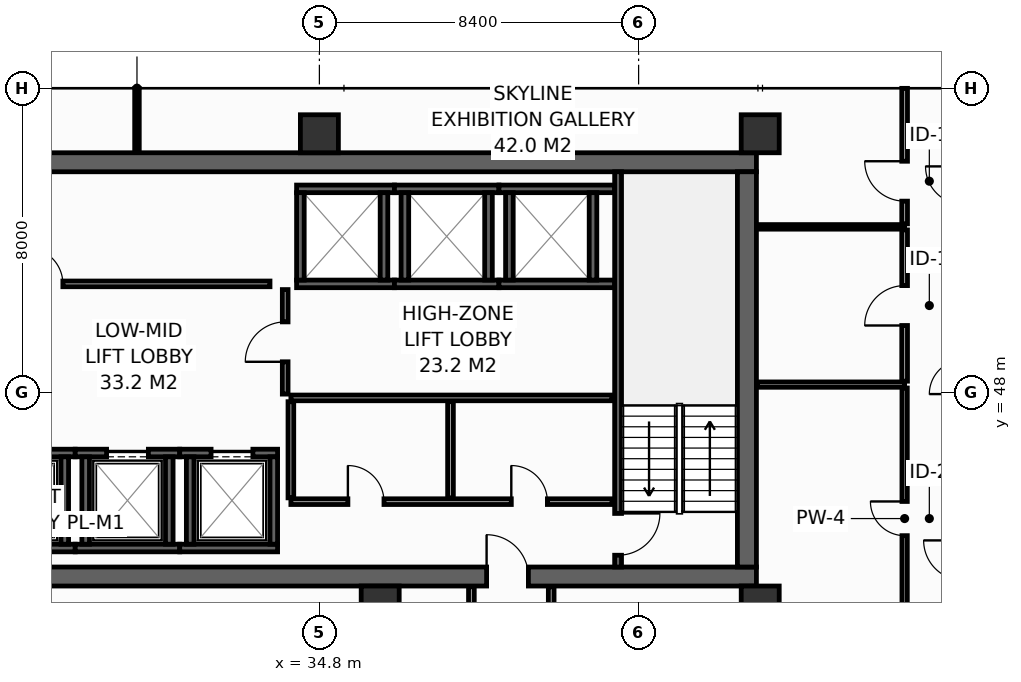
"""IFC4 building model, lengths in metres.
Left out: names, types, materials, properties, quantities, classifications, styles, units other than length and angle.
Written with IfcOpenShell. Run it as: python <this file> out.ifc"""

import sys

from ifc_helpers import new_model, si_unit, direction, frame, frame_2d, origin, origin_2d, place, context, subcontext, project, spatial, rectangle, hollow_rectangle, extrude, element, fill, save


model = new_model("IFC4")
c1 = context("Model", 3, precision=1e-05, world=origin(), true_north=direction((0.0, 1.0)))
c2 = subcontext(c1, "Body", "Model", "MODEL_VIEW")
j1 = project(units=[si_unit("LENGTHUNIT", "METRE"), si_unit("PLANEANGLEUNIT", "RADIAN")], contexts=[c1])
p1 = place(None, origin())
s1 = spatial("IfcSite", under=j1, at=p1, CompositionType="ELEMENT")
p2 = place(p1, origin())
s2 = spatial("IfcBuilding", under=s1, at=p2, CompositionType="ELEMENT")
p3 = place(p2, frame((0.0, 0.0, 156.2)))
s3 = spatial("IfcBuildingStorey", under=s2, at=p3, CompositionType="ELEMENT", Elevation=156.2)
p4 = place(p3, frame((13.6, 43.15, 0.0), z_axis=(0.0, 0.0, 1.0), x_axis=(1.0, 0.0, 0.0)))
e1 = element("IfcWall", 1, at=p4, inside=s3, PredefinedType="SHEAR", context=c2, shape_type="SweptSolid", body=[
    extrude(rectangle(XDim=32.7, YDim=0.5, at=frame_2d((16.35, 0.0))), origin(), (0.0, 0.0, 1.0), 3.55),
])
p5 = place(p4, frame((5.4, 0.0, 0.0)))
e2 = element("IfcOpeningElement", 2, at=p5, cuts=e1, PredefinedType="OPENING", context=c2, shape_type="SweptSolid", body=[
    extrude(rectangle(XDim=1.1, YDim=2.15, at=frame_2d((0.55, 1.075))), frame((0.0, 0.26, 0.0), z_axis=(0.0, -1.0, 0.0), x_axis=(1.0, 0.0, 0.0)), (0.0, 0.0, 1.0), 0.52),
])
p6 = place(p4, frame((25.6, 0.0, 0.0)))
e3 = element("IfcOpeningElement", 3, at=p6, cuts=e1, PredefinedType="OPENING", context=c2, shape_type="SweptSolid", body=[
    extrude(rectangle(XDim=1.1, YDim=2.15, at=frame_2d((0.55, 1.075))), frame((0.0, 0.26, 0.0), z_axis=(0.0, -1.0, 0.0), x_axis=(1.0, 0.0, 0.0)), (0.0, 0.0, 1.0), 0.52),
])
p7 = place(p3, frame((13.6, 54.05, 0.0), z_axis=(0.0, 0.0, 1.0), x_axis=(1.0, 0.0, 0.0)))
e4 = element("IfcWall", 4, at=p7, inside=s3, PredefinedType="SHEAR", context=c2, shape_type="SweptSolid", body=[
    extrude(rectangle(XDim=32.7, YDim=0.5, at=frame_2d((16.35, 0.0))), origin(), (0.0, 0.0, 1.0), 3.55),
])
p8 = place(p3, frame((46.05, 43.4, 0.0), z_axis=(0.0, 0.0, 1.0), x_axis=(0.0, 1.0, 0.0)))
e5 = element("IfcWall", 5, at=p8, inside=s3, PredefinedType="SHEAR", context=c2, shape_type="SweptSolid", body=[
    extrude(rectangle(XDim=10.4, YDim=0.5, at=frame_2d((5.2, 0.0))), origin(), (0.0, 0.0, 1.0), 3.55),
])
for number, where, z_axis, x_axis in (
    (6, (34.8, 54.8, 0.0), (0.0, 0.0, 1.0), (1.0, 0.0, 0.0)),
    (7, (46.4, 54.8, 0.0), (0.0, 0.0, 1.0), (1.0, 0.0, 0.0)),
    (8, (36.4, 42.4, 0.0), (0.0, 0.0, 1.0), (1.0, 0.0, 0.0)),
    (9, (46.4, 42.4, 0.0), (0.0, 0.0, 1.0), (1.0, 0.0, 0.0)),
):
    element("IfcColumn", number, at=place(p3, frame(where, z_axis=z_axis, x_axis=x_axis)), inside=s3, PredefinedType="COLUMN", context=c2, shape_type="SweptSolid", body=[
        extrude(hollow_rectangle(XDim=1.0, YDim=1.0, WallThickness=0.045, at=origin_2d()), origin(), (0.0, 0.0, 1.0), 3.8),
    ])
p9 = place(p3, frame((25.8, 43.9, 0.0), z_axis=(0.0, 0.0, 1.0), x_axis=(1.0, 0.0, 0.0)))
e10 = element("IfcWall", 10, at=p9, inside=s3, PredefinedType="SHEAR", context=c2, shape_type="SweptSolid", body=[
    extrude(rectangle(XDim=2.575, YDim=0.2, at=frame_2d((1.288, 0.0))), origin(), (0.0, 0.0, 1.0), 3.55),
])
p10 = place(p3, frame((25.8, 46.4, 0.0), z_axis=(0.0, 0.0, 1.0), x_axis=(1.0, 0.0, 0.0)))
e11 = element("IfcWall", 11, at=p10, inside=s3, PredefinedType="SHEAR", context=c2, shape_type="SweptSolid", body=[
    extrude(rectangle(XDim=2.575, YDim=0.2, at=frame_2d((1.288, 0.0))), origin(), (0.0, 0.0, 1.0), 3.55),
])
p11 = place(p10, frame((0.65, 0.0, 0.0)))
e12 = element("IfcOpeningElement", 12, at=p11, cuts=e11, PredefinedType="OPENING", context=c2, shape_type="SweptSolid", body=[
    extrude(rectangle(XDim=1.1, YDim=2.2, at=frame_2d((0.55, 1.1))), frame((0.0, 0.11, 0.0), z_axis=(0.0, -1.0, 0.0), x_axis=(1.0, 0.0, 0.0)), (0.0, 0.0, 1.0), 0.22),
])
p12 = place(p3, frame((28.1, 44.0, 0.0), z_axis=(0.0, 0.0, 1.0), x_axis=(0.0, 1.0, 0.0)))
e13 = element("IfcWall", 13, at=p12, inside=s3, PredefinedType="SHEAR", context=c2, shape_type="SweptSolid", body=[
    extrude(rectangle(XDim=2.3, YDim=0.2, at=frame_2d((1.15, 0.0))), origin(), (0.0, 0.0, 1.0), 3.55),
])
p13 = place(p3, frame((28.375, 43.9, 0.0), z_axis=(0.0, 0.0, 1.0), x_axis=(1.0, 0.0, 0.0)))
e14 = element("IfcWall", 14, at=p13, inside=s3, PredefinedType="SHEAR", context=c2, shape_type="SweptSolid", body=[
    extrude(rectangle(XDim=2.75, YDim=0.2, at=frame_2d((1.375, 0.0))), origin(), (0.0, 0.0, 1.0), 3.55),
])
p14 = place(p3, frame((28.375, 46.4, 0.0), z_axis=(0.0, 0.0, 1.0), x_axis=(1.0, 0.0, 0.0)))
e15 = element("IfcWall", 15, at=p14, inside=s3, PredefinedType="SHEAR", context=c2, shape_type="SweptSolid", body=[
    extrude(rectangle(XDim=2.75, YDim=0.2, at=frame_2d((1.375, 0.0))), origin(), (0.0, 0.0, 1.0), 3.55),
])
p15 = place(p14, frame((0.825, 0.0, 0.0)))
e16 = element("IfcOpeningElement", 16, at=p15, cuts=e15, PredefinedType="OPENING", context=c2, shape_type="SweptSolid", body=[
    extrude(rectangle(XDim=1.1, YDim=2.2, at=frame_2d((0.55, 1.1))), frame((0.0, 0.11, 0.0), z_axis=(0.0, -1.0, 0.0), x_axis=(1.0, 0.0, 0.0)), (0.0, 0.0, 1.0), 0.22),
])
for number, where, z_axis, x_axis in (
    (17, (28.65, 44.0, 0.0), (0.0, 0.0, 1.0), (0.0, 1.0, 0.0)),
    (18, (30.85, 44.0, 0.0), (0.0, 0.0, 1.0), (0.0, 1.0, 0.0)),
):
    element("IfcWall", number, at=place(p3, frame(where, z_axis=z_axis, x_axis=x_axis)), inside=s3, PredefinedType="SHEAR", context=c2, shape_type="SweptSolid", body=[
        extrude(rectangle(XDim=2.3, YDim=0.2, at=frame_2d((1.15, 0.0))), origin(), (0.0, 0.0, 1.0), 3.55),
    ])
p16 = place(p3, frame((31.125, 43.9, 0.0), z_axis=(0.0, 0.0, 1.0), x_axis=(1.0, 0.0, 0.0)))
e19 = element("IfcWall", 19, at=p16, inside=s3, PredefinedType="SHEAR", context=c2, shape_type="SweptSolid", body=[
    extrude(rectangle(XDim=2.575, YDim=0.2, at=frame_2d((1.288, 0.0))), origin(), (0.0, 0.0, 1.0), 3.55),
])
p17 = place(p3, frame((31.125, 46.4, 0.0), z_axis=(0.0, 0.0, 1.0), x_axis=(1.0, 0.0, 0.0)))
e20 = element("IfcWall", 20, at=p17, inside=s3, PredefinedType="SHEAR", context=c2, shape_type="SweptSolid", body=[
    extrude(rectangle(XDim=2.575, YDim=0.2, at=frame_2d((1.288, 0.0))), origin(), (0.0, 0.0, 1.0), 3.55),
])
p18 = place(p17, frame((0.825, 0.0, 0.0)))
e21 = element("IfcOpeningElement", 21, at=p18, cuts=e20, PredefinedType="OPENING", context=c2, shape_type="SweptSolid", body=[
    extrude(rectangle(XDim=1.1, YDim=2.2, at=frame_2d((0.55, 1.1))), frame((0.0, 0.11, 0.0), z_axis=(0.0, -1.0, 0.0), x_axis=(1.0, 0.0, 0.0)), (0.0, 0.0, 1.0), 0.22),
])
for number, where, z_axis, x_axis in (
    (22, (31.4, 44.0, 0.0), (0.0, 0.0, 1.0), (0.0, 1.0, 0.0)),
    (23, (33.6, 44.0, 0.0), (0.0, 0.0, 1.0), (0.0, 1.0, 0.0)),
):
    element("IfcWall", number, at=place(p3, frame(where, z_axis=z_axis, x_axis=x_axis)), inside=s3, PredefinedType="SHEAR", context=c2, shape_type="SweptSolid", body=[
        extrude(rectangle(XDim=2.3, YDim=0.2, at=frame_2d((1.15, 0.0))), origin(), (0.0, 0.0, 1.0), 3.55),
    ])
for number, where, z_axis, x_axis in (
    (24, (34.2, 50.85, 0.0), (0.0, 0.0, 1.0), (1.0, 0.0, 0.0)),
    (25, (34.2, 53.35, 0.0), (0.0, 0.0, 1.0), (1.0, 0.0, 0.0)),
):
    element("IfcWall", number, at=place(p3, frame(where, z_axis=z_axis, x_axis=x_axis)), inside=s3, PredefinedType="SHEAR", context=c2, shape_type="SweptSolid", body=[
        extrude(rectangle(XDim=2.575, YDim=0.2, at=frame_2d((1.288, 0.0))), origin(), (0.0, 0.0, 1.0), 3.55),
    ])
for number, where, z_axis, x_axis in (
    (26, (34.3, 50.95, 0.0), (0.0, 0.0, 1.0), (0.0, 1.0, 0.0)),
    (27, (36.5, 50.95, 0.0), (0.0, 0.0, 1.0), (0.0, 1.0, 0.0)),
):
    element("IfcWall", number, at=place(p3, frame(where, z_axis=z_axis, x_axis=x_axis)), inside=s3, PredefinedType="SHEAR", context=c2, shape_type="SweptSolid", body=[
        extrude(rectangle(XDim=2.3, YDim=0.2, at=frame_2d((1.15, 0.0))), origin(), (0.0, 0.0, 1.0), 3.55),
    ])
for number, where, z_axis, x_axis in (
    (28, (36.775, 50.85, 0.0), (0.0, 0.0, 1.0), (1.0, 0.0, 0.0)),
    (29, (36.775, 53.35, 0.0), (0.0, 0.0, 1.0), (1.0, 0.0, 0.0)),
):
    element("IfcWall", number, at=place(p3, frame(where, z_axis=z_axis, x_axis=x_axis)), inside=s3, PredefinedType="SHEAR", context=c2, shape_type="SweptSolid", body=[
        extrude(rectangle(XDim=2.75, YDim=0.2, at=frame_2d((1.375, 0.0))), origin(), (0.0, 0.0, 1.0), 3.55),
    ])
for number, where, z_axis, x_axis in (
    (30, (37.05, 50.95, 0.0), (0.0, 0.0, 1.0), (0.0, 1.0, 0.0)),
    (31, (39.25, 50.95, 0.0), (0.0, 0.0, 1.0), (0.0, 1.0, 0.0)),
):
    element("IfcWall", number, at=place(p3, frame(where, z_axis=z_axis, x_axis=x_axis)), inside=s3, PredefinedType="SHEAR", context=c2, shape_type="SweptSolid", body=[
        extrude(rectangle(XDim=2.3, YDim=0.2, at=frame_2d((1.15, 0.0))), origin(), (0.0, 0.0, 1.0), 3.55),
    ])
for number, where, z_axis, x_axis in (
    (32, (39.525, 50.85, 0.0), (0.0, 0.0, 1.0), (1.0, 0.0, 0.0)),
    (33, (39.525, 53.35, 0.0), (0.0, 0.0, 1.0), (1.0, 0.0, 0.0)),
):
    element("IfcWall", number, at=place(p3, frame(where, z_axis=z_axis, x_axis=x_axis)), inside=s3, PredefinedType="SHEAR", context=c2, shape_type="SweptSolid", body=[
        extrude(rectangle(XDim=3.045, YDim=0.2, at=frame_2d((1.522, 0.0))), origin(), (0.0, 0.0, 1.0), 3.55),
    ])
for number, where, z_axis, x_axis in (
    (34, (39.8, 50.95, 0.0), (0.0, 0.0, 1.0), (0.0, 1.0, 0.0)),
    (35, (42.0, 50.95, 0.0), (0.0, 0.0, 1.0), (0.0, 1.0, 0.0)),
):
    element("IfcWall", number, at=place(p3, frame(where, z_axis=z_axis, x_axis=x_axis)), inside=s3, PredefinedType="SHEAR", context=c2, shape_type="SweptSolid", body=[
        extrude(rectangle(XDim=2.3, YDim=0.2, at=frame_2d((1.15, 0.0))), origin(), (0.0, 0.0, 1.0), 3.55),
    ])
p19 = place(p3, frame((42.66, 53.8, 0.0), z_axis=(0.0, 0.0, 1.0), x_axis=(0.0, -1.0, 0.0)))
e36 = element("IfcWall", 36, at=p19, inside=s3, PredefinedType="SHEAR", context=c2, shape_type="SweptSolid", body=[
    extrude(rectangle(XDim=10.4, YDim=0.18, at=frame_2d((5.2, 0.0))), origin(), (0.0, 0.0, 1.0), 3.55),
])
p20 = place(p19, frame((8.99, 0.0, 0.0)))
e37 = element("IfcOpeningElement", 37, at=p20, cuts=e36, PredefinedType="OPENING", context=c2, shape_type="SweptSolid", body=[
    extrude(rectangle(XDim=1.1, YDim=2.15, at=frame_2d((0.55, 1.075))), frame((0.0, 0.1, 0.0), z_axis=(0.0, -1.0, 0.0), x_axis=(1.0, 0.0, 0.0)), (0.0, 0.0, 1.0), 0.2),
])
p21 = place(p3, frame((33.9, 47.95, 0.0), z_axis=(0.0, 0.0, 1.0), x_axis=(0.0, 1.0, 0.0)))
e38 = element("IfcWall", 38, at=p21, inside=s3, PredefinedType="PARTITIONING", context=c2, shape_type="SweptSolid", body=[
    extrude(rectangle(XDim=2.75, YDim=0.15, at=frame_2d((1.375, 0.0))), origin(), (0.0, 0.0, 1.0), 3.55),
])
p22 = place(p21, frame((0.85, 0.0, 0.0)))
e39 = element("IfcOpeningElement", 39, at=p22, cuts=e38, PredefinedType="OPENING", context=c2, shape_type="SweptSolid", body=[
    extrude(rectangle(XDim=1.05, YDim=2.15, at=frame_2d((0.525, 1.075))), frame((0.0, 0.085, 0.0), z_axis=(0.0, -1.0, 0.0), x_axis=(1.0, 0.0, 0.0)), (0.0, 0.0, 1.0), 0.17),
])
p23 = place(p3, frame((34.05, 45.12, 0.0), z_axis=(0.0, 0.0, 1.0), x_axis=(1.0, 0.0, 0.0)))
e40 = element("IfcWall", 40, at=p23, inside=s3, PredefinedType="PARTITIONING", context=c2, shape_type="SweptSolid", body=[
    extrude(rectangle(XDim=8.45, YDim=0.15, at=frame_2d((4.225, 0.0))), origin(), (0.0, 0.0, 1.0), 3.55),
])
p24 = place(p23, frame((1.5, 0.0, 0.0)))
e41 = element("IfcOpeningElement", 41, at=p24, cuts=e40, PredefinedType="OPENING", context=c2, shape_type="SweptSolid", body=[
    extrude(rectangle(XDim=0.95, YDim=2.15, at=frame_2d((0.475, 1.075))), frame((0.0, 0.085, 0.0), z_axis=(0.0, -1.0, 0.0), x_axis=(1.0, 0.0, 0.0)), (0.0, 0.0, 1.0), 0.17),
])
p25 = place(p23, frame((5.8, 0.0, 0.0)))
e42 = element("IfcOpeningElement", 42, at=p25, cuts=e40, PredefinedType="OPENING", context=c2, shape_type="SweptSolid", body=[
    extrude(rectangle(XDim=0.95, YDim=2.15, at=frame_2d((0.475, 1.075))), frame((0.0, 0.085, 0.0), z_axis=(0.0, -1.0, 0.0), x_axis=(1.0, 0.0, 0.0)), (0.0, 0.0, 1.0), 0.17),
])
p26 = place(p3, frame((34.05, 47.85, 0.0), z_axis=(0.0, 0.0, 1.0), x_axis=(1.0, 0.0, 0.0)))
e43 = element("IfcWall", 43, at=p26, inside=s3, PredefinedType="PARTITIONING", context=c2, shape_type="SweptSolid", body=[
    extrude(rectangle(XDim=8.45, YDim=0.15, at=frame_2d((4.225, 0.0))), origin(), (0.0, 0.0, 1.0), 3.55),
])
for number, where, z_axis, x_axis in (
    (44, (38.25, 45.22, 0.0), (0.0, 0.0, 1.0), (0.0, 1.0, 0.0)),
    (45, (34.05, 45.22, 0.0), (0.0, 0.0, 1.0), (0.0, 1.0, 0.0)),
):
    element("IfcWall", number, at=place(p3, frame(where, z_axis=z_axis, x_axis=x_axis)), inside=s3, PredefinedType="PARTITIONING", context=c2, shape_type="SweptSolid", body=[
        extrude(rectangle(XDim=2.53, YDim=0.15, at=frame_2d((1.265, 0.0))), origin(), (0.0, 0.0, 1.0), 3.55),
    ])
p27 = place(p3, frame((25.85, 50.85, 0.0), z_axis=(0.0, 0.0, 1.0), x_axis=(1.0, 0.0, 0.0)))
e46 = element("IfcWall", 46, at=p27, inside=s3, PredefinedType="PARTITIONING", context=c2, shape_type="SweptSolid", body=[
    extrude(rectangle(XDim=7.65, YDim=0.15, at=frame_2d((3.825, 0.0))), origin(), (0.0, 0.0, 1.0), 3.55),
])
p28 = place(p27, frame((1.25, 0.0, 0.0)))
e47 = element("IfcOpeningElement", 47, at=p28, cuts=e46, PredefinedType="OPENING", context=c2, shape_type="SweptSolid", body=[
    extrude(rectangle(XDim=0.95, YDim=2.15, at=frame_2d((0.475, 1.075))), frame((0.0, 0.085, 0.0), z_axis=(0.0, -1.0, 0.0), x_axis=(1.0, 0.0, 0.0)), (0.0, 0.0, 1.0), 0.17),
])
p29 = place(p3, frame((46.15, 41.24, 0.0), z_axis=(0.0, 0.0, 1.0), x_axis=(0.0, 1.0, 0.0)))
e48 = element("IfcWall", 48, at=p29, inside=s3, PredefinedType="PARTITIONING", context=c2, shape_type="SweptSolid", body=[
    extrude(rectangle(XDim=1.64, YDim=0.14, at=frame_2d((0.82, 0.0))), origin(), (0.0, 0.0, 1.0), 3.55),
])
p30 = place(p3, frame((46.32, 48.2, 0.0), z_axis=(0.0, 0.0, 1.0), x_axis=(1.0, 0.0, 0.0)))
e49 = element("IfcWall", 49, at=p30, inside=s3, PredefinedType="PARTITIONING", context=c2, shape_type="SweptSolid", body=[
    extrude(rectangle(XDim=3.88, YDim=0.14, at=frame_2d((1.94, 0.0))), origin(), (0.0, 0.0, 1.0), 3.55),
])
p31 = place(p3, frame((50.2, 41.24, 0.0), z_axis=(0.0, 0.0, 1.0), x_axis=(0.0, 1.0, 0.0)))
e50 = element("IfcWall", 50, at=p31, inside=s3, PredefinedType="PARTITIONING", context=c2, shape_type="SweptSolid", body=[
    extrude(rectangle(XDim=6.87, YDim=0.14, at=frame_2d((3.435, 0.0))), origin(), (0.0, 0.0, 1.0), 2.835),
])
p32 = place(p31, frame((2.985, 0.0, 0.0)))
e51 = element("IfcOpeningElement", 51, at=p32, cuts=e50, PredefinedType="OPENING", context=c2, shape_type="SweptSolid", body=[
    extrude(rectangle(XDim=0.9, YDim=2.1, at=frame_2d((0.45, 1.05))), frame((0.0, 0.08, 0.0), z_axis=(0.0, -1.0, 0.0), x_axis=(1.0, 0.0, 0.0)), (0.0, 0.0, 1.0), 0.16),
])
p33 = place(p3, frame((46.32, 52.35, 0.0), z_axis=(0.0, 0.0, 1.0), x_axis=(1.0, 0.0, 0.0)))
e52 = element("IfcWall", 52, at=p33, inside=s3, PredefinedType="PARTITIONING", context=c2, shape_type="SweptSolid", body=[
    extrude(rectangle(XDim=3.88, YDim=0.12, at=frame_2d((1.94, 0.0))), origin(), (0.0, 0.0, 1.0), 3.55),
])
p34 = place(p3, frame((30.0, 54.32, 0.0), z_axis=(0.0, 0.0, 1.0), x_axis=(0.0, 1.0, 0.0)))
e53 = element("IfcWall", 53, at=p34, inside=s3, PredefinedType="PARTITIONING", context=c2, shape_type="SweptSolid", body=[
    extrude(rectangle(XDim=1.675, YDim=0.12, at=frame_2d((0.837, 0.0))), origin(), (0.0, 0.0, 1.0), 2.935),
])
p35 = place(p3, frame((50.2, 48.29, 0.0), z_axis=(0.0, 0.0, 1.0), x_axis=(0.0, 1.0, 0.0)))
e54 = element("IfcWall", 54, at=p35, inside=s3, PredefinedType="PARTITIONING", context=c2, shape_type="SweptSolid", body=[
    extrude(rectangle(XDim=3.98, YDim=0.15, at=frame_2d((1.99, 0.0))), origin(), (0.0, 0.0, 1.0), 3.55),
])
p36 = place(p35, frame((1.465, 0.0, 0.0)))
e55 = element("IfcOpeningElement", 55, at=p36, cuts=e54, PredefinedType="OPENING", context=c2, shape_type="SweptSolid", body=[
    extrude(rectangle(XDim=1.05, YDim=2.15, at=frame_2d((0.525, 1.075))), frame((0.0, 0.085, 0.0), z_axis=(0.0, -1.0, 0.0), x_axis=(1.0, 0.0, 0.0)), (0.0, 0.0, 1.0), 0.17),
])
p37 = place(p3, frame((50.2, 52.43, 0.0), z_axis=(0.0, 0.0, 1.0), x_axis=(0.0, 1.0, 0.0)))
e56 = element("IfcWall", 56, at=p37, inside=s3, PredefinedType="PARTITIONING", context=c2, shape_type="SweptSolid", body=[
    extrude(rectangle(XDim=3.565, YDim=0.15, at=frame_2d((1.783, 0.0))), origin(), (0.0, 0.0, 1.0), 2.935),
])
p38 = place(p37, frame((0.597, 0.0, 0.0)))
e57 = element("IfcOpeningElement", 57, at=p38, cuts=e56, PredefinedType="OPENING", context=c2, shape_type="SweptSolid", body=[
    extrude(rectangle(XDim=1.05, YDim=2.15, at=frame_2d((0.525, 1.075))), frame((0.0, 0.085, 0.0), z_axis=(0.0, -1.0, 0.0), x_axis=(1.0, 0.0, 0.0)), (0.0, 0.0, 1.0), 0.17),
])
for number, where, z_axis, x_axis in (
    (58, (38.8, 41.15, 0.0), (0.0, 0.0, 1.0), (0.0, 1.0, 0.0)),
    (59, (40.9, 41.15, 0.0), (0.0, 0.0, 1.0), (0.0, 1.0, 0.0)),
):
    element("IfcWall", number, at=place(p3, frame(where, z_axis=z_axis, x_axis=x_axis)), inside=s3, PredefinedType="PARTITIONING", context=c2, shape_type="SweptSolid", body=[
        extrude(rectangle(XDim=1.73, YDim=0.15, at=frame_2d((0.865, 0.0))), origin(), (0.0, 0.0, 1.0), 3.55),
    ])
p39 = place(p15, origin())
e60 = element("IfcDoor", 60, at=p39, inside=s3, OperationType="SLIDING_TO_LEFT", PredefinedType="DOOR", context=c2, shape_type="SweptSolid", body=[
    extrude(rectangle(XDim=1.1, YDim=2.2, at=frame_2d((0.55, 1.1))), frame((0.0, 0.025, 0.0), z_axis=(0.0, -1.0, 0.0), x_axis=(1.0, 0.0, 0.0)), (0.0, 0.0, 1.0), 0.05),
])
fill(e16, e60)
p40 = place(p18, origin())
e61 = element("IfcDoor", 61, at=p40, inside=s3, OperationType="SLIDING_TO_LEFT", PredefinedType="DOOR", context=c2, shape_type="SweptSolid", body=[
    extrude(rectangle(XDim=1.1, YDim=2.2, at=frame_2d((0.55, 1.1))), frame((0.0, 0.025, 0.0), z_axis=(0.0, -1.0, 0.0), x_axis=(1.0, 0.0, 0.0)), (0.0, 0.0, 1.0), 0.05),
])
fill(e21, e61)
p41 = place(p20, origin())
e62 = element("IfcDoor", 62, at=p41, inside=s3, OperationType="SINGLE_SWING_LEFT", PredefinedType="DOOR", context=c2, shape_type="SweptSolid", body=[
    extrude(rectangle(XDim=1.1, YDim=2.15, at=frame_2d((0.55, 1.075))), frame((0.0, 0.025, 0.0), z_axis=(0.0, -1.0, 0.0), x_axis=(1.0, 0.0, 0.0)), (0.0, 0.0, 1.0), 0.05),
])
fill(e37, e62)
p42 = place(p6, origin())
e63 = element("IfcDoor", 63, at=p42, inside=s3, OperationType="SINGLE_SWING_LEFT", PredefinedType="DOOR", context=c2, shape_type="SweptSolid", body=[
    extrude(rectangle(XDim=1.1, YDim=2.15, at=frame_2d((0.55, 1.075))), frame((0.0, 0.025, 0.0), z_axis=(0.0, -1.0, 0.0), x_axis=(1.0, 0.0, 0.0)), (0.0, 0.0, 1.0), 0.05),
])
fill(e3, e63)
p43 = place(p22, origin())
e64 = element("IfcDoor", 64, at=p43, inside=s3, OperationType="SINGLE_SWING_LEFT", PredefinedType="DOOR", context=c2, shape_type="SweptSolid", body=[
    extrude(rectangle(XDim=1.05, YDim=2.15, at=frame_2d((0.525, 1.075))), frame((0.0, 0.025, 0.0), z_axis=(0.0, -1.0, 0.0), x_axis=(1.0, 0.0, 0.0)), (0.0, 0.0, 1.0), 0.05),
])
fill(e39, e64)
p44 = place(p24, origin())
e65 = element("IfcDoor", 65, at=p44, inside=s3, OperationType="SINGLE_SWING_LEFT", PredefinedType="DOOR", context=c2, shape_type="SweptSolid", body=[
    extrude(rectangle(XDim=0.95, YDim=2.15, at=frame_2d((0.475, 1.075))), frame((0.0, 0.025, 0.0), z_axis=(0.0, -1.0, 0.0), x_axis=(1.0, 0.0, 0.0)), (0.0, 0.0, 1.0), 0.05),
])
fill(e41, e65)
p45 = place(p25, origin())
e66 = element("IfcDoor", 66, at=p45, inside=s3, OperationType="SINGLE_SWING_LEFT", PredefinedType="DOOR", context=c2, shape_type="SweptSolid", body=[
    extrude(rectangle(XDim=0.95, YDim=2.15, at=frame_2d((0.475, 1.075))), frame((0.0, 0.025, 0.0), z_axis=(0.0, -1.0, 0.0), x_axis=(1.0, 0.0, 0.0)), (0.0, 0.0, 1.0), 0.05),
])
fill(e42, e66)
p46 = place(p28, origin())
e67 = element("IfcDoor", 67, at=p46, inside=s3, OperationType="SINGLE_SWING_LEFT", PredefinedType="DOOR", context=c2, shape_type="SweptSolid", body=[
    extrude(rectangle(XDim=0.95, YDim=2.15, at=frame_2d((0.475, 1.075))), frame((0.0, 0.025, 0.0), z_axis=(0.0, -1.0, 0.0), x_axis=(1.0, 0.0, 0.0)), (0.0, 0.0, 1.0), 0.05),
])
fill(e47, e67)
p47 = place(p32, origin())
e68 = element("IfcDoor", 68, at=p47, inside=s3, OperationType="SINGLE_SWING_RIGHT", PredefinedType="DOOR", context=c2, shape_type="SweptSolid", body=[
    extrude(rectangle(XDim=0.9, YDim=2.1, at=frame_2d((0.45, 1.05))), frame((0.0, 0.025, 0.0), z_axis=(0.0, -1.0, 0.0), x_axis=(1.0, 0.0, 0.0)), (0.0, 0.0, 1.0), 0.05),
])
fill(e51, e68)
p48 = place(p36, origin())
e69 = element("IfcDoor", 69, at=p48, inside=s3, OperationType="SINGLE_SWING_LEFT", PredefinedType="DOOR", context=c2, shape_type="SweptSolid", body=[
    extrude(rectangle(XDim=1.05, YDim=2.15, at=frame_2d((0.525, 1.075))), frame((0.0, 0.025, 0.0), z_axis=(0.0, -1.0, 0.0), x_axis=(1.0, 0.0, 0.0)), (0.0, 0.0, 1.0), 0.05),
])
fill(e55, e69)
p49 = place(p38, origin())
e70 = element("IfcDoor", 70, at=p49, inside=s3, OperationType="SINGLE_SWING_RIGHT", PredefinedType="DOOR", context=c2, shape_type="SweptSolid", body=[
    extrude(rectangle(XDim=1.05, YDim=2.15, at=frame_2d((0.525, 1.075))), frame((0.0, 0.025, 0.0), z_axis=(0.0, -1.0, 0.0), x_axis=(1.0, 0.0, 0.0)), (0.0, 0.0, 1.0), 0.05),
])
fill(e57, e70)
save(model, sys.argv[1])
